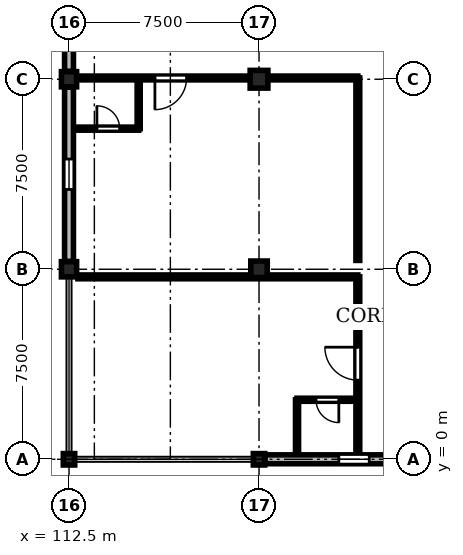
"""IFC4 building model, lengths in metres.
Left out: names, types, materials, properties, quantities, classifications, styles, units other than length and angle.
Written with IfcOpenShell. Run it as: python <this file> out.ifc"""

import sys

from ifc_helpers import new_model, si_unit, direction, frame, frame_2d, origin, origin_2d, place, context, subcontext, project, spatial, rectangle, extrude, element, fill, save


model = new_model("IFC4")
c1 = context("Model", 3, precision=1e-05, world=origin(), true_north=direction((0.0, 1.0)))
c2 = subcontext(c1, "Body", "Model", "MODEL_VIEW")
j1 = project(units=[si_unit("LENGTHUNIT", "METRE"), si_unit("PLANEANGLEUNIT", "RADIAN")], contexts=[c1])
p1 = place(None, origin())
s1 = spatial("IfcSite", under=j1, at=p1, CompositionType="ELEMENT")
p2 = place(p1, origin())
s2 = spatial("IfcBuilding", under=s1, at=p2, CompositionType="ELEMENT")
p3 = place(p2, frame((0.0, 0.0, 9.3)))
s3 = spatial("IfcBuildingStorey", under=s2, at=p3, CompositionType="ELEMENT", Elevation=9.3)
p4 = place(p3, frame((112.5, 0.0, 0.0), z_axis=(0.0, 0.0, 1.0), x_axis=(1.0, 0.0, 0.0)))
e1 = element("IfcColumn", 1, at=p4, inside=s3, PredefinedType="COLUMN", context=c2, shape_type="SweptSolid", body=[
    extrude(rectangle(XDim=0.45, YDim=0.45, at=origin_2d()), origin(), (0.0, 0.0, 1.0), 4.8),
])
for number, where, z_axis, x_axis in (
    (2, (112.5, 7.5, 0.0), (0.0, 0.0, 1.0), (1.0, 0.0, 0.0)),
    (3, (112.5, 15.0, 0.0), (0.0, 0.0, 1.0), (1.0, 0.0, 0.0)),
):
    element("IfcColumn", number, at=place(p3, frame(where, z_axis=z_axis, x_axis=x_axis)), inside=s3, PredefinedType="COLUMN", context=c2, shape_type="SweptSolid", body=[
        extrude(rectangle(XDim=0.6, YDim=0.6, at=origin_2d()), origin(), (0.0, 0.0, 1.0), 4.8),
    ])
p5 = place(p3, frame((120.0, 0.0, 0.0), z_axis=(0.0, 0.0, 1.0), x_axis=(1.0, 0.0, 0.0)))
e4 = element("IfcColumn", 4, at=p5, inside=s3, PredefinedType="COLUMN", context=c2, shape_type="SweptSolid", body=[
    extrude(rectangle(XDim=0.45, YDim=0.45, at=origin_2d()), origin(), (0.0, 0.0, 1.0), 4.8),
])
p6 = place(p3, frame((120.0, 7.5, 0.0), z_axis=(0.0, 0.0, 1.0), x_axis=(1.0, 0.0, 0.0)))
e5 = element("IfcColumn", 5, at=p6, inside=s3, PredefinedType="COLUMN", context=c2, shape_type="SweptSolid", body=[
    extrude(rectangle(XDim=0.65, YDim=0.65, at=origin_2d()), origin(), (0.0, 0.0, 1.0), 4.8),
])
p7 = place(p3, frame((120.0, 15.0, 0.0), z_axis=(0.0, 0.0, 1.0), x_axis=(1.0, 0.0, 0.0)))
e6 = element("IfcColumn", 6, at=p7, inside=s3, PredefinedType="COLUMN", context=c2, shape_type="SweptSolid", body=[
    extrude(rectangle(XDim=0.7, YDim=0.7, at=origin_2d()), origin(), (0.0, 0.0, 1.0), 4.8),
])
p8 = place(p3, frame((112.5, 7.81, 0.0), z_axis=(0.0, 0.0, 1.0), x_axis=(0.0, 1.0, 0.0)))
e7 = element("IfcWall", 7, at=p8, inside=s3, PredefinedType="STANDARD", context=c2, shape_type="SweptSolid", body=[
    extrude(rectangle(XDim=6.88, YDim=0.35, at=frame_2d((3.44, 0.0))), origin(), (0.0, 0.0, 1.0), 3.95),
])
p9 = place(p8, frame((2.84, 0.0, 0.9)))
e8 = element("IfcOpeningElement", 8, at=p9, cuts=e7, PredefinedType="OPENING", context=c2, shape_type="SweptSolid", body=[
    extrude(rectangle(XDim=1.2, YDim=2.1, at=frame_2d((0.6, 1.05))), frame((0.0, 0.185, 0.0), z_axis=(0.0, -1.0, 0.0), x_axis=(1.0, 0.0, 0.0)), (0.0, 0.0, 1.0), 0.37),
])
p10 = place(p3, frame((112.5, 15.31, 0.0), z_axis=(0.0, 0.0, 1.0), x_axis=(0.0, 1.0, 0.0)))
e9 = element("IfcWall", 9, at=p10, inside=s3, PredefinedType="STANDARD", context=c2, shape_type="SweptSolid", body=[
    extrude(rectangle(XDim=7.02, YDim=0.35, at=frame_2d((3.51, 0.0))), origin(), (0.0, 0.0, 1.0), 3.95),
])
p11 = place(p10, frame((2.46, 0.0, 0.9)))
e10 = element("IfcOpeningElement", 10, at=p11, cuts=e9, PredefinedType="OPENING", context=c2, shape_type="SweptSolid", body=[
    extrude(rectangle(XDim=2.1, YDim=2.1, at=frame_2d((1.05, 1.05))), frame((0.0, 0.185, 0.0), z_axis=(0.0, -1.0, 0.0), x_axis=(1.0, 0.0, 0.0)), (0.0, 0.0, 1.0), 0.37),
])
p12 = place(p3, frame((127.265, 0.0, 0.0), z_axis=(0.0, 0.0, 1.0), x_axis=(-1.0, 0.0, 0.0)))
e11 = element("IfcWall", 11, at=p12, inside=s3, PredefinedType="STANDARD", context=c2, shape_type="SweptSolid", body=[
    extrude(rectangle(XDim=7.03, YDim=0.35, at=frame_2d((3.515, 0.0))), origin(), (0.0, 0.0, 1.0), 3.95),
])
p13 = place(p12, frame((2.915, 0.0, 0.9)))
e12 = element("IfcOpeningElement", 12, at=p13, cuts=e11, PredefinedType="OPENING", context=c2, shape_type="SweptSolid", body=[
    extrude(rectangle(XDim=1.2, YDim=2.1, at=frame_2d((0.6, 1.05))), frame((0.0, 0.185, 0.0), z_axis=(0.0, -1.0, 0.0), x_axis=(1.0, 0.0, 0.0)), (0.0, 0.0, 1.0), 0.37),
])
p14 = place(p3, frame((123.9, 0.35, 0.0), z_axis=(0.0, 0.0, 1.0), x_axis=(0.0, 1.0, 0.0)))
e13 = element("IfcWall", 13, at=p14, inside=s3, PredefinedType="PARTITIONING", context=c2, shape_type="SweptSolid", body=[
    extrude(rectangle(XDim=6.85, YDim=0.15, at=frame_2d((3.425, 0.0))), origin(), (0.0, 0.0, 1.0), 4.535),
])
p15 = place(p14, frame((2.775, 0.0, 0.0)))
e14 = element("IfcOpeningElement", 14, at=p15, cuts=e13, PredefinedType="OPENING", context=c2, shape_type="SweptSolid", body=[
    extrude(rectangle(XDim=1.3, YDim=2.2, at=frame_2d((0.65, 1.1))), frame((0.0, 0.085, 0.0), z_axis=(0.0, -1.0, 0.0), x_axis=(1.0, 0.0, 0.0)), (0.0, 0.0, 1.0), 0.17),
])
p16 = place(p3, frame((123.9, 2.35, 0.0), z_axis=(0.0, 0.0, 1.0), x_axis=(-1.0, 0.0, 0.0)))
e15 = element("IfcWall", 15, at=p16, inside=s3, PredefinedType="PARTITIONING", context=c2, shape_type="SweptSolid", body=[
    extrude(rectangle(XDim=2.4, YDim=0.12, at=frame_2d((1.2, 0.0))), origin(), (0.0, 0.0, 1.0), 4.535),
])
p17 = place(p16, frame((0.75, 0.0, 0.0)))
e16 = element("IfcOpeningElement", 16, at=p17, cuts=e15, PredefinedType="OPENING", context=c2, shape_type="SweptSolid", body=[
    extrude(rectangle(XDim=0.9, YDim=2.1, at=frame_2d((0.45, 1.05))), frame((0.0, 0.07, 0.0), z_axis=(0.0, -1.0, 0.0), x_axis=(1.0, 0.0, 0.0)), (0.0, 0.0, 1.0), 0.14),
])
p18 = place(p3, frame((121.5, 0.35, 0.0), z_axis=(0.0, 0.0, 1.0), x_axis=(0.0, 1.0, 0.0)))
e17 = element("IfcWall", 17, at=p18, inside=s3, PredefinedType="PARTITIONING", context=c2, shape_type="SweptSolid", body=[
    extrude(rectangle(XDim=2.0, YDim=0.12, at=frame_2d((1.0, 0.0))), origin(), (0.0, 0.0, 1.0), 4.535),
])
p19 = place(p3, frame((123.9, 15.05, 0.0), z_axis=(0.0, 0.0, 1.0), x_axis=(-1.0, 0.0, 0.0)))
e18 = element("IfcWall", 18, at=p19, inside=s3, PredefinedType="PARTITIONING", context=c2, shape_type="SweptSolid", body=[
    extrude(rectangle(XDim=11.05, YDim=0.15, at=frame_2d((5.525, 0.0))), origin(), (0.0, 0.0, 1.0), 3.985),
])
p20 = place(p19, frame((6.76, 0.0, 0.0)))
e19 = element("IfcOpeningElement", 19, at=p20, cuts=e18, PredefinedType="OPENING", context=c2, shape_type="SweptSolid", body=[
    extrude(rectangle(XDim=1.25, YDim=2.2, at=frame_2d((0.625, 1.1))), frame((0.0, 0.085, 0.0), z_axis=(0.0, -1.0, 0.0), x_axis=(1.0, 0.0, 0.0)), (0.0, 0.0, 1.0), 0.17),
])
p21 = place(p3, frame((112.85, 13.05, 0.0), z_axis=(0.0, 0.0, 1.0), x_axis=(1.0, 0.0, 0.0)))
e20 = element("IfcWall", 20, at=p21, inside=s3, PredefinedType="PARTITIONING", context=c2, shape_type="SweptSolid", body=[
    extrude(rectangle(XDim=2.4, YDim=0.12, at=frame_2d((1.2, 0.0))), origin(), (0.0, 0.0, 1.0), 4.535),
])
p22 = place(p21, frame((0.75, 0.0, 0.0)))
e21 = element("IfcOpeningElement", 21, at=p22, cuts=e20, PredefinedType="OPENING", context=c2, shape_type="SweptSolid", body=[
    extrude(rectangle(XDim=0.9, YDim=2.1, at=frame_2d((0.45, 1.05))), frame((0.0, 0.07, 0.0), z_axis=(0.0, -1.0, 0.0), x_axis=(1.0, 0.0, 0.0)), (0.0, 0.0, 1.0), 0.14),
])
p23 = place(p3, frame((115.25, 13.05, 0.0), z_axis=(0.0, 0.0, 1.0), x_axis=(0.0, 1.0, 0.0)))
e22 = element("IfcWall", 22, at=p23, inside=s3, PredefinedType="PARTITIONING", context=c2, shape_type="SweptSolid", body=[
    extrude(rectangle(XDim=2.0, YDim=0.12, at=frame_2d((1.0, 0.0))), origin(), (0.0, 0.0, 1.0), 4.535),
])
p24 = place(p3, frame((112.85, 7.2, 0.0), z_axis=(0.0, 0.0, 1.0), x_axis=(1.0, 0.0, 0.0)))
e23 = element("IfcWall", 23, at=p24, inside=s3, PredefinedType="PARTITIONING", context=c2, shape_type="SweptSolid", body=[
    extrude(rectangle(XDim=11.05, YDim=0.15, at=frame_2d((5.525, 0.0))), origin(), (0.0, 0.0, 1.0), 3.985),
])
p25 = place(p3, frame((123.9, 7.85, 0.0), z_axis=(0.0, 0.0, 1.0), x_axis=(0.0, 1.0, 0.0)))
e24 = element("IfcWall", 24, at=p25, inside=s3, PredefinedType="PARTITIONING", context=c2, shape_type="SweptSolid", body=[
    extrude(rectangle(XDim=7.2, YDim=0.15, at=frame_2d((3.6, 0.0))), origin(), (0.0, 0.0, 1.0), 4.535),
])
p26 = place(p9, origin())
e25 = element("IfcWindow", 25, at=p26, inside=s3, PartitioningType="SINGLE_PANEL", PredefinedType="WINDOW", context=c2, shape_type="SweptSolid", body=[
    extrude(rectangle(XDim=1.2, YDim=2.1, at=frame_2d((0.6, 1.05))), frame((0.0, 0.03, 0.0), z_axis=(0.0, -1.0, 0.0), x_axis=(1.0, 0.0, 0.0)), (0.0, 0.0, 1.0), 0.06),
])
fill(e8, e25)
p27 = place(p13, origin())
e26 = element("IfcWindow", 26, at=p27, inside=s3, PartitioningType="SINGLE_PANEL", PredefinedType="WINDOW", context=c2, shape_type="SweptSolid", body=[
    extrude(rectangle(XDim=1.2, YDim=2.1, at=frame_2d((0.6, 1.05))), frame((0.0, 0.03, 0.0), z_axis=(0.0, -1.0, 0.0), x_axis=(1.0, 0.0, 0.0)), (0.0, 0.0, 1.0), 0.06),
])
fill(e12, e26)
p28 = place(p15, origin())
e27 = element("IfcDoor", 27, at=p28, inside=s3, OperationType="SINGLE_SWING_RIGHT", PredefinedType="DOOR", context=c2, shape_type="SweptSolid", body=[
    extrude(rectangle(XDim=1.3, YDim=2.2, at=frame_2d((0.65, 1.1))), frame((0.0, 0.025, 0.0), z_axis=(0.0, -1.0, 0.0), x_axis=(1.0, 0.0, 0.0)), (0.0, 0.0, 1.0), 0.05),
])
fill(e14, e27)
p29 = place(p17, origin())
e28 = element("IfcDoor", 28, at=p29, inside=s3, OperationType="SINGLE_SWING_LEFT", PredefinedType="DOOR", context=c2, shape_type="SweptSolid", body=[
    extrude(rectangle(XDim=0.9, YDim=2.1, at=frame_2d((0.45, 1.05))), frame((0.0, 0.025, 0.0), z_axis=(0.0, -1.0, 0.0), x_axis=(1.0, 0.0, 0.0)), (0.0, 0.0, 1.0), 0.05),
])
fill(e16, e28)
p30 = place(p20, origin())
e29 = element("IfcDoor", 29, at=p30, inside=s3, OperationType="SINGLE_SWING_RIGHT", PredefinedType="DOOR", context=c2, shape_type="SweptSolid", body=[
    extrude(rectangle(XDim=1.25, YDim=2.2, at=frame_2d((0.625, 1.1))), frame((0.0, 0.025, 0.0), z_axis=(0.0, -1.0, 0.0), x_axis=(1.0, 0.0, 0.0)), (0.0, 0.0, 1.0), 0.05),
])
fill(e19, e29)
p31 = place(p22, origin())
e30 = element("IfcDoor", 30, at=p31, inside=s3, OperationType="SINGLE_SWING_LEFT", PredefinedType="DOOR", context=c2, shape_type="SweptSolid", body=[
    extrude(rectangle(XDim=0.9, YDim=2.1, at=frame_2d((0.45, 1.05))), frame((0.0, 0.025, 0.0), z_axis=(0.0, -1.0, 0.0), x_axis=(1.0, 0.0, 0.0)), (0.0, 0.0, 1.0), 0.05),
])
fill(e21, e30)
save(model, sys.argv[1])
